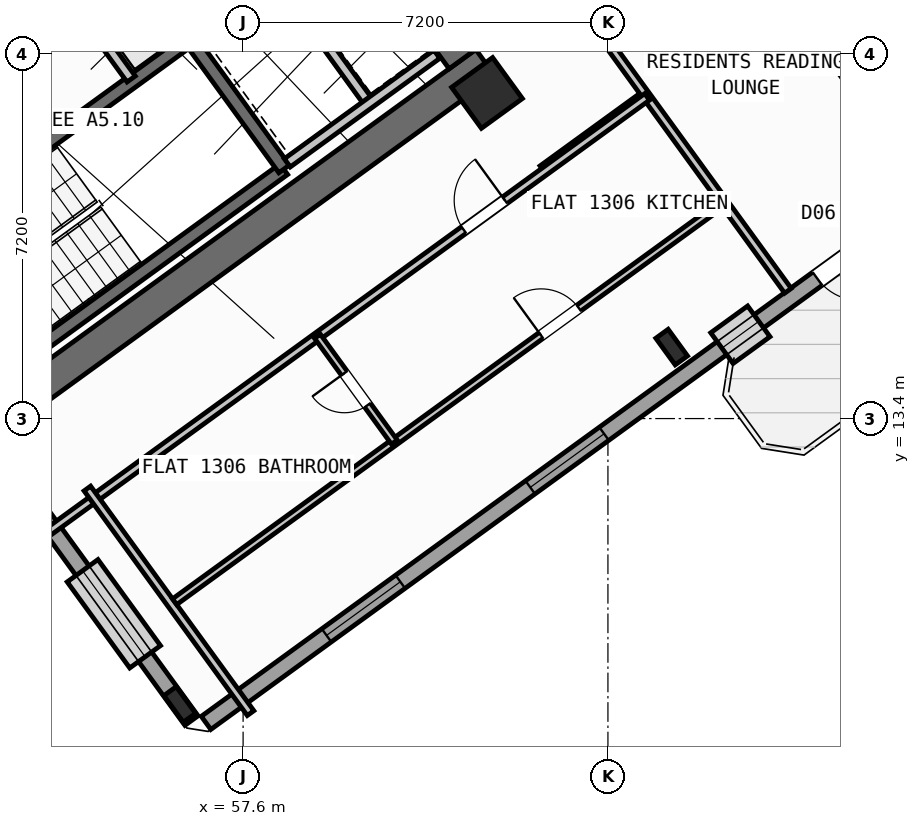
"""IFC4 building model, lengths in metres.
Left out: names, types, materials, properties, quantities, classifications, styles, units other than length and angle.
Written with IfcOpenShell. Run it as: python <this file> out.ifc"""

import sys

from ifc_helpers import new_model, si_unit, direction, frame, frame_2d, origin, origin_2d, place, context, subcontext, project, spatial, rectangle, hollow_rectangle, i_section, extrude, source, transform, mapped, element, fill, save


model = new_model("IFC4")
c1 = context("Model", 3, precision=1e-05, world=origin(), true_north=direction((0.0, 1.0)))
c2 = subcontext(c1, "Body", "Model", "MODEL_VIEW")
j1 = project(units=[si_unit("LENGTHUNIT", "METRE"), si_unit("PLANEANGLEUNIT", "RADIAN")], contexts=[c1])
p1 = place(None, origin())
s1 = spatial("IfcSite", under=j1, at=p1, CompositionType="ELEMENT")
p2 = place(p1, origin())
s2 = spatial("IfcBuilding", under=s1, at=p2, CompositionType="ELEMENT")
p3 = place(p2, frame((0.0, 0.0, 52.8)))
s3 = spatial("IfcBuildingStorey", under=s2, at=p3, CompositionType="ELEMENT", Elevation=52.8)
p4 = place(p3, frame((52.318, 13.11, 0.0), z_axis=(0.0, 0.0, 1.0), x_axis=(0.809019445368, 0.587781878776, 0.0)))
e1 = element("IfcWall", 1, at=p4, inside=s3, PredefinedType="SHEAR", context=c2, shape_type="SweptSolid", body=[
    extrude(rectangle(XDim=12.44, YDim=0.65, at=frame_2d((6.22, 0.0))), origin(), (0.0, 0.0, 1.0), 3.35),
])
p5 = place(p3, frame((61.929, 20.494, 0.0), z_axis=(0.0, 0.0, 1.0), x_axis=(-0.58782982593, 0.808984607855, 0.0)))
e2 = element("IfcWall", 2, at=p5, inside=s3, PredefinedType="SHEAR", context=c2, shape_type="SweptSolid", body=[
    extrude(rectangle(XDim=3.525, YDim=0.65, at=frame_2d((1.762, 0.0))), origin(), (0.0, 0.0, 1.0), 3.35),
])
m1 = source(origin(), c2, "Body", "SweptSolid", [
    extrude(i_section(OverallWidth=0.3, OverallDepth=0.65, WebThickness=0.016, FlangeThickness=0.031, at=origin_2d()), origin(), (0.0, 0.0, 1.0), 3.6),
])
for number, where, z_axis, x_axis in (
    (3, (56.35, 7.758, 0.0), (0.0, 0.0, 1.0), (0.809, 0.588, 0.0)),
    (4, (66.058, 14.811, 0.0), (0.0, 0.0, 1.0), (0.809, 0.588, 0.0)),
):
    element("IfcColumn", number, at=place(p3, frame(where, z_axis=z_axis, x_axis=x_axis)), inside=s3, PredefinedType="COLUMN", context=c2, shape_type="MappedRepresentation", body=[
        mapped(m1, transform((0.0, 0.0, 0.0), scale=1.0)),
    ])
m2 = source(origin(), c2, "Body", "SweptSolid", [
    extrude(hollow_rectangle(XDim=1.0, YDim=1.0, WallThickness=0.04, at=origin_2d()), origin(), (0.0, 0.0, 1.0), 3.6),
])
p6 = place(p3, frame((62.414, 19.827, 0.0), z_axis=(0.0, 0.0, 1.0), x_axis=(0.809016994375, 0.587785252292, 0.0)))
e5 = element("IfcColumn", 5, at=p6, inside=s3, PredefinedType="COLUMN", context=c2, shape_type="MappedRepresentation", body=[
    mapped(m2, transform((0.0, 0.0, 0.0), scale=1.0)),
])
p7 = place(p3, frame((58.455, 35.484, 0.0), z_axis=(0.0, 0.0, 1.0), x_axis=(0.587783625747, -0.809018176127, 0.0)))
e6 = element("IfcWall", 6, at=p7, inside=s3, PredefinedType="STANDARD", context=c2, shape_type="SweptSolid", body=[
    extrude(rectangle(XDim=21.587, YDim=0.32, at=frame_2d((10.794, 0.0))), origin(), (0.0, 0.0, 1.0), 2.725),
])
p8 = place(p7, frame((1.5, 0.0, 0.8)))
e7 = element("IfcOpeningElement", 7, at=p8, cuts=e6, PredefinedType="OPENING", context=c2, shape_type="SweptSolid", body=[
    extrude(rectangle(XDim=2.1, YDim=1.55, at=frame_2d((1.05, 0.775))), frame((0.0, 0.17, 0.0), z_axis=(0.0, -1.0, 0.0), x_axis=(1.0, 0.0, 0.0)), (0.0, 0.0, 1.0), 0.34),
])
p9 = place(p7, frame((5.105, 0.0, 0.85)))
e8 = element("IfcOpeningElement", 8, at=p9, cuts=e6, PredefinedType="OPENING", context=c2, shape_type="SweptSolid", body=[
    extrude(rectangle(XDim=1.5, YDim=1.5, at=frame_2d((0.75, 0.75))), frame((0.0, 0.17, 0.0), z_axis=(0.0, -1.0, 0.0), x_axis=(1.0, 0.0, 0.0)), (0.0, 0.0, 1.0), 0.34),
])
p10 = place(p7, frame((8.954, 0.0, 0.85)))
e9 = element("IfcOpeningElement", 9, at=p10, cuts=e6, PredefinedType="OPENING", context=c2, shape_type="SweptSolid", body=[
    extrude(rectangle(XDim=1.5, YDim=1.5, at=frame_2d((0.75, 0.75))), frame((0.0, 0.17, 0.0), z_axis=(0.0, -1.0, 0.0), x_axis=(1.0, 0.0, 0.0)), (0.0, 0.0, 1.0), 0.34),
])
p11 = place(p7, frame((17.581, 0.0, 0.95)))
e10 = element("IfcOpeningElement", 10, at=p11, cuts=e6, PredefinedType="OPENING", context=c2, shape_type="SweptSolid", body=[
    extrude(rectangle(XDim=1.2, YDim=1.4, at=frame_2d((0.6, 0.7))), frame((0.0, 0.17, 0.0), z_axis=(0.0, -1.0, 0.0), x_axis=(1.0, 0.0, 0.0)), (0.0, 0.0, 1.0), 0.34),
])
p12 = place(p3, frame((71.098, 17.731, 0.0), z_axis=(0.0, 0.0, 1.0), x_axis=(-0.809021120468, -0.587779573171, 0.0)))
e11 = element("IfcWall", 11, at=p12, inside=s3, PredefinedType="STANDARD", context=c2, shape_type="SweptSolid", body=[
    extrude(rectangle(XDim=17.588, YDim=0.32, at=frame_2d((8.794, 0.0))), origin(), (0.0, 0.0, 1.0), 3.35),
])
p13 = place(p12, frame((1.624, 0.0, 0.0)))
e12 = element("IfcOpeningElement", 12, at=p13, cuts=e11, PredefinedType="OPENING", context=c2, shape_type="SweptSolid", body=[
    extrude(rectangle(XDim=1.05, YDim=2.15, at=frame_2d((0.525, 1.075))), frame((0.0, 0.17, 0.0), z_axis=(0.0, -1.0, 0.0), x_axis=(1.0, 0.0, 0.0)), (0.0, 0.0, 1.0), 0.34),
])
p14 = place(p12, frame((4.104, 0.0, 1.0)))
e13 = element("IfcOpeningElement", 13, at=p14, cuts=e11, PredefinedType="OPENING", context=c2, shape_type="SweptSolid", body=[
    extrude(rectangle(XDim=0.9, YDim=1.25, at=frame_2d((0.45, 0.625))), frame((0.0, 0.17, 0.0), z_axis=(0.0, -1.0, 0.0), x_axis=(1.0, 0.0, 0.0)), (0.0, 0.0, 1.0), 0.34),
])
p15 = place(p12, frame((7.879, 0.0, 0.85)))
e14 = element("IfcOpeningElement", 14, at=p15, cuts=e11, PredefinedType="OPENING", context=c2, shape_type="SweptSolid", body=[
    extrude(rectangle(XDim=1.8, YDim=1.5, at=frame_2d((0.9, 0.75))), frame((0.0, 0.17, 0.0), z_axis=(0.0, -1.0, 0.0), x_axis=(1.0, 0.0, 0.0)), (0.0, 0.0, 1.0), 0.34),
])
p16 = place(p12, frame((12.849, 0.0, 0.85)))
e15 = element("IfcOpeningElement", 15, at=p16, cuts=e11, PredefinedType="OPENING", context=c2, shape_type="SweptSolid", body=[
    extrude(rectangle(XDim=1.8, YDim=1.5, at=frame_2d((0.9, 0.75))), frame((0.0, 0.17, 0.0), z_axis=(0.0, -1.0, 0.0), x_axis=(1.0, 0.0, 0.0)), (0.0, 0.0, 1.0), 0.34),
])
p17 = place(p3, frame((56.581, 7.439, 0.0), z_axis=(0.0, 0.0, 1.0), x_axis=(-0.587785875463, 0.809016541614, 0.0)))
e16 = element("IfcWall", 16, at=p17, inside=s3, PredefinedType="STANDARD", context=c2, shape_type="SweptSolid", body=[
    extrude(rectangle(XDim=6.774, YDim=0.32, at=frame_2d((3.387, 0.0))), origin(), (0.0, 0.0, 1.0), 2.725),
])
p18 = place(p17, frame((1.556, 0.0, 0.8)))
e17 = element("IfcOpeningElement", 17, at=p18, cuts=e16, PredefinedType="OPENING", context=c2, shape_type="SweptSolid", body=[
    extrude(rectangle(XDim=2.1, YDim=1.55, at=frame_2d((1.05, 0.775))), frame((0.0, 0.17, 0.0), z_axis=(0.0, -1.0, 0.0), x_axis=(1.0, 0.0, 0.0)), (0.0, 0.0, 1.0), 0.34),
])
p19 = place(p3, frame((52.472, 14.013, 0.0), z_axis=(0.0, 0.0, 1.0), x_axis=(0.809028366311, 0.587769599847, 0.0)))
e18 = element("IfcWall", 18, at=p19, inside=s3, PredefinedType="SHEAR", context=c2, shape_type="SweptSolid", body=[
    extrude(rectangle(XDim=7.33, YDim=0.26, at=frame_2d((3.665, 0.0))), origin(), (0.0, 0.0, 1.0), 3.35),
])
p20 = place(p3, frame((50.615, 16.57, 0.0), z_axis=(0.0, 0.0, 1.0), x_axis=(0.809028366311, 0.587769599847, 0.0)))
e19 = element("IfcWall", 19, at=p20, inside=s3, PredefinedType="SHEAR", context=c2, shape_type="SweptSolid", body=[
    extrude(rectangle(XDim=7.33, YDim=0.26, at=frame_2d((3.665, 0.0))), origin(), (0.0, 0.0, 1.0), 3.35),
])
p21 = place(p20, frame((0.22, 0.0, 0.0)))
e20 = element("IfcOpeningElement", 20, at=p21, cuts=e19, PredefinedType="OPENING", context=c2, shape_type="SweptSolid", body=[
    extrude(rectangle(XDim=1.1, YDim=2.1, at=frame_2d((0.55, 1.05))), frame((0.0, 0.14, 0.0), z_axis=(0.0, -1.0, 0.0), x_axis=(1.0, 0.0, 0.0)), (0.0, 0.0, 1.0), 0.28),
])
p22 = place(p3, frame((58.41, 18.327, 0.0), z_axis=(0.0, 0.0, 1.0), x_axis=(-0.58776738483, 0.809029975545, 0.0)))
e21 = element("IfcWall", 21, at=p22, inside=s3, PredefinedType="SHEAR", context=c2, shape_type="SweptSolid", body=[
    extrude(rectangle(XDim=3.16, YDim=0.26, at=frame_2d((1.58, 0.0))), origin(), (0.0, 0.0, 1.0), 3.35),
])
p23 = place(p3, frame((55.391, 20.102, 0.0), z_axis=(0.0, 0.0, 1.0), x_axis=(-0.58778447739, 0.809017557374, 0.0)))
e22 = element("IfcWall", 22, at=p23, inside=s3, PredefinedType="STANDARD", context=c2, shape_type="SweptSolid", body=[
    extrude(rectangle(XDim=1.65, YDim=0.2, at=frame_2d((0.825, 0.0))), origin(), (0.0, 0.0, 1.0), 3.34),
])
p24 = place(p3, frame((60.067, 19.655, 0.0), z_axis=(0.0, 0.0, 1.0), x_axis=(-0.587800520745, 0.809005900975, 0.0)))
e23 = element("IfcWall", 23, at=p24, inside=s3, PredefinedType="STANDARD", context=c2, shape_type="SweptSolid", body=[
    extrude(rectangle(XDim=2.66, YDim=0.2, at=frame_2d((1.33, 0.0))), origin(), (0.0, 0.0, 1.0), 3.34),
])
p25 = place(p3, frame((58.472, 18.447, 0.0), z_axis=(0.0, 0.0, 1.0), x_axis=(0.809022487728, 0.587777691266, 0.0)))
e24 = element("IfcWall", 24, at=p25, inside=s3, PredefinedType="STANDARD", context=c2, shape_type="SweptSolid", body=[
    extrude(rectangle(XDim=3.648, YDim=0.2, at=frame_2d((1.824, 0.0))), origin(), (0.0, 0.0, 1.0), 3.34),
])
p26 = place(p3, frame((63.507, 18.322, 0.0), z_axis=(0.0, 0.0, 1.0), x_axis=(0.809034604122, 0.587761013791, 0.0)))
e25 = element("IfcWall", 25, at=p26, inside=s3, PredefinedType="PARTITIONING", context=c2, shape_type="SweptSolid", body=[
    extrude(rectangle(XDim=2.51, YDim=0.16, at=frame_2d((1.255, 0.0))), origin(), (0.0, 0.0, 1.0), 3.34),
])
p27 = place(p3, frame((68.353, 15.922, 0.0), z_axis=(0.0, 0.0, 1.0), x_axis=(-0.58776839458, 0.809029241952, 0.0)))
e26 = element("IfcWall", 26, at=p27, inside=s3, PredefinedType="PARTITIONING", context=c2, shape_type="SweptSolid", body=[
    extrude(rectangle(XDim=8.1, YDim=0.16, at=frame_2d((4.05, 0.0))), origin(), (0.0, 0.0, 1.0), 3.34),
])
p28 = place(p3, frame((53.705, 11.126, 0.0), z_axis=(0.0, 0.0, 1.0), x_axis=(0.809014504436, 0.587788679384, 0.0)))
e27 = element("IfcWall", 27, at=p28, inside=s3, PredefinedType="PARTITIONING", context=c2, shape_type="SweptSolid", body=[
    extrude(rectangle(XDim=14.67, YDim=0.16, at=frame_2d((7.335, 0.0))), origin(), (0.0, 0.0, 1.0), 3.34),
])
p29 = place(p28, frame((10.2, 0.0, 0.0)))
e28 = element("IfcOpeningElement", 28, at=p29, cuts=e27, PredefinedType="OPENING", context=c2, shape_type="SweptSolid", body=[
    extrude(rectangle(XDim=1.0, YDim=2.1, at=frame_2d((0.5, 1.05))), frame((0.0, 0.09, 0.0), z_axis=(0.0, -1.0, 0.0), x_axis=(1.0, 0.0, 0.0)), (0.0, 0.0, 1.0), 0.18),
])
p30 = place(p3, frame((57.747, 7.586, 0.0), z_axis=(0.0, 0.0, 1.0), x_axis=(-0.587784893399, 0.809017255126, 0.0)))
e29 = element("IfcWall", 29, at=p30, inside=s3, PredefinedType="PARTITIONING", context=c2, shape_type="SweptSolid", body=[
    extrude(rectangle(XDim=5.48, YDim=0.16, at=frame_2d((2.74, 0.0))), origin(), (0.0, 0.0, 1.0), 3.34),
])
p31 = place(p3, frame((56.249, 9.785, 0.0), z_axis=(0.0, 0.0, 1.0), x_axis=(0.809011747655, 0.587792473715, 0.0)))
e30 = element("IfcWall", 30, at=p31, inside=s3, PredefinedType="PLUMBINGWALL", context=c2, shape_type="SweptSolid", body=[
    extrude(rectangle(XDim=13.4, YDim=0.14, at=frame_2d((6.7, 0.0))), origin(), (0.0, 0.0, 1.0), 3.34),
])
p32 = place(p31, frame((8.94, 0.0, 0.0)))
e31 = element("IfcOpeningElement", 31, at=p32, cuts=e30, PredefinedType="OPENING", context=c2, shape_type="SweptSolid", body=[
    extrude(rectangle(XDim=0.92, YDim=2.08, at=frame_2d((0.46, 1.04))), frame((0.0, 0.08, 0.0), z_axis=(0.0, -1.0, 0.0), x_axis=(1.0, 0.0, 0.0)), (0.0, 0.0, 1.0), 0.16),
])
p33 = place(p3, frame((60.585, 12.936, 0.0), z_axis=(0.0, 0.0, 1.0), x_axis=(-0.587772116736, 0.809026537752, 0.0)))
e32 = element("IfcWall", 32, at=p33, inside=s3, PredefinedType="PLUMBINGWALL", context=c2, shape_type="SweptSolid", body=[
    extrude(rectangle(XDim=2.58, YDim=0.14, at=frame_2d((1.29, 0.0))), origin(), (0.0, 0.0, 1.0), 3.34),
])
p34 = place(p33, frame((0.9, 0.0, 0.0)))
e33 = element("IfcOpeningElement", 33, at=p34, cuts=e32, PredefinedType="OPENING", context=c2, shape_type="SweptSolid", body=[
    extrude(rectangle(XDim=0.78, YDim=2.05, at=frame_2d((0.39, 1.025))), frame((0.0, 0.08, 0.0), z_axis=(0.0, -1.0, 0.0), x_axis=(1.0, 0.0, 0.0)), (0.0, 0.0, 1.0), 0.16),
])
m3 = source(origin(), c2, "Body", "SweptSolid", [
    extrude(rectangle(XDim=1.05, YDim=2.15, at=frame_2d((0.525, 1.075))), frame((0.0, 0.025, 0.0), z_axis=(0.0, -1.0, 0.0), x_axis=(1.0, 0.0, 0.0)), (0.0, 0.0, 1.0), 0.05),
])
p35 = place(p13, origin())
e34 = element("IfcDoor", 34, at=p35, inside=s3, OperationType="SINGLE_SWING_LEFT", PredefinedType="DOOR", context=c2, shape_type="MappedRepresentation", body=[
    mapped(m3, transform((0.0, 0.0, 0.0), scale=1.0)),
])
fill(e12, e34)
m4 = source(origin(), c2, "Body", "SweptSolid", [
    extrude(rectangle(XDim=1.2, YDim=1.4, at=frame_2d((0.6, 0.7))), frame((0.0, 0.03, 0.0), z_axis=(0.0, -1.0, 0.0), x_axis=(1.0, 0.0, 0.0)), (0.0, 0.0, 1.0), 0.06),
])
p36 = place(p11, origin())
e35 = element("IfcWindow", 35, at=p36, inside=s3, PartitioningType="SINGLE_PANEL", PredefinedType="WINDOW", context=c2, shape_type="MappedRepresentation", body=[
    mapped(m4, transform((0.0, 0.0, 0.0), scale=1.0)),
])
fill(e10, e35)
m5 = source(origin(), c2, "Body", "SweptSolid", [
    extrude(rectangle(XDim=0.9, YDim=1.25, at=frame_2d((0.45, 0.625))), frame((0.0, 0.03, 0.0), z_axis=(0.0, -1.0, 0.0), x_axis=(1.0, 0.0, 0.0)), (0.0, 0.0, 1.0), 0.06),
])
p37 = place(p14, origin())
e36 = element("IfcWindow", 36, at=p37, inside=s3, PartitioningType="SINGLE_PANEL", PredefinedType="WINDOW", context=c2, shape_type="MappedRepresentation", body=[
    mapped(m5, transform((0.0, 0.0, 0.0), scale=1.0)),
])
fill(e13, e36)
m6 = source(origin(), c2, "Body", "SweptSolid", [
    extrude(rectangle(XDim=1.8, YDim=1.5, at=frame_2d((0.9, 0.75))), frame((0.0, 0.03, 0.0), z_axis=(0.0, -1.0, 0.0), x_axis=(1.0, 0.0, 0.0)), (0.0, 0.0, 1.0), 0.06),
])
p38 = place(p15, origin())
e37 = element("IfcWindow", 37, at=p38, inside=s3, PartitioningType="SINGLE_PANEL", PredefinedType="WINDOW", context=c2, shape_type="MappedRepresentation", body=[
    mapped(m6, transform((0.0, 0.0, 0.0), scale=1.0)),
])
fill(e14, e37)
p39 = place(p16, origin())
e38 = element("IfcWindow", 38, at=p39, inside=s3, PartitioningType="SINGLE_PANEL", PredefinedType="WINDOW", context=c2, shape_type="MappedRepresentation", body=[
    mapped(m6, transform((0.0, 0.0, 0.0), scale=1.0)),
])
fill(e15, e38)
m7 = source(origin(), c2, "Body", "SweptSolid", [
    extrude(rectangle(XDim=2.1, YDim=1.55, at=frame_2d((1.05, 0.775))), frame((0.0, 0.03, 0.0), z_axis=(0.0, -1.0, 0.0), x_axis=(1.0, 0.0, 0.0)), (0.0, 0.0, 1.0), 0.06),
])
p40 = place(p18, origin())
e39 = element("IfcWindow", 39, at=p40, inside=s3, PartitioningType="SINGLE_PANEL", PredefinedType="WINDOW", context=c2, shape_type="MappedRepresentation", body=[
    mapped(m7, transform((0.0, 0.0, 0.0), scale=1.0)),
])
fill(e17, e39)
m8 = source(origin(), c2, "Body", "SweptSolid", [
    extrude(rectangle(XDim=1.0, YDim=2.1, at=frame_2d((0.5, 1.05))), frame((0.0, 0.025, 0.0), z_axis=(0.0, -1.0, 0.0), x_axis=(1.0, 0.0, 0.0)), (0.0, 0.0, 1.0), 0.05),
])
p41 = place(p29, origin())
e40 = element("IfcDoor", 40, at=p41, inside=s3, OperationType="SINGLE_SWING_RIGHT", PredefinedType="DOOR", context=c2, shape_type="MappedRepresentation", body=[
    mapped(m8, transform((0.0, 0.0, 0.0), scale=1.0)),
])
fill(e28, e40)
m9 = source(origin(), c2, "Body", "SweptSolid", [
    extrude(rectangle(XDim=0.92, YDim=2.08, at=frame_2d((0.46, 1.04))), frame((0.0, 0.025, 0.0), z_axis=(0.0, -1.0, 0.0), x_axis=(1.0, 0.0, 0.0)), (0.0, 0.0, 1.0), 0.05),
])
p42 = place(p32, origin())
e41 = element("IfcDoor", 41, at=p42, inside=s3, OperationType="SINGLE_SWING_LEFT", PredefinedType="DOOR", context=c2, shape_type="MappedRepresentation", body=[
    mapped(m9, transform((0.0, 0.0, 0.0), scale=1.0)),
])
fill(e31, e41)
m10 = source(origin(), c2, "Body", "SweptSolid", [
    extrude(rectangle(XDim=0.78, YDim=2.05, at=frame_2d((0.39, 1.025))), frame((0.0, 0.025, 0.0), z_axis=(0.0, -1.0, 0.0), x_axis=(1.0, 0.0, 0.0)), (0.0, 0.0, 1.0), 0.05),
])
p43 = place(p34, origin())
e42 = element("IfcDoor", 42, at=p43, inside=s3, OperationType="SINGLE_SWING_RIGHT", PredefinedType="DOOR", context=c2, shape_type="MappedRepresentation", body=[
    mapped(m10, transform((0.0, 0.0, 0.0), scale=1.0)),
])
fill(e33, e42)
save(model, sys.argv[1])
